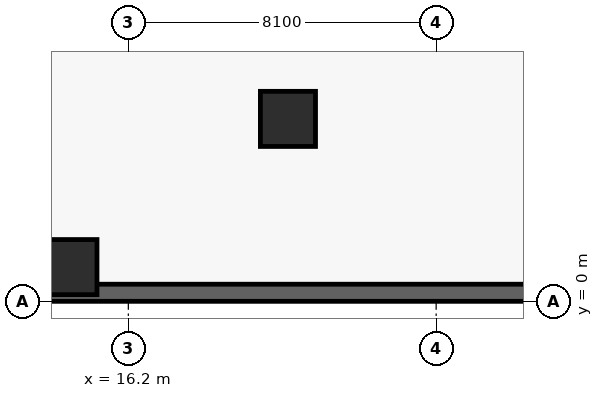
"""IFC4 building model, lengths in metres.
Left out: names, types, materials, properties, quantities, classifications, styles, units other than length and angle.
Written with IfcOpenShell. Run it as: python <this file> out.ifc"""

import sys

from ifc_helpers import new_model, si_unit, direction, frame, frame_2d, origin, origin_2d, place, context, subcontext, project, spatial, rectangle, extrude, source, transform, mapped, element, save


model = new_model("IFC4")
c1 = context("Model", 3, precision=1e-05, world=origin(), true_north=direction((0.0, 1.0)))
c2 = subcontext(c1, "Body", "Model", "MODEL_VIEW")
j1 = project(units=[si_unit("LENGTHUNIT", "METRE"), si_unit("PLANEANGLEUNIT", "RADIAN")], contexts=[c1])
p1 = place(None, origin())
s1 = spatial("IfcSite", under=j1, at=p1, CompositionType="ELEMENT")
p2 = place(p1, origin())
s2 = spatial("IfcBuilding", under=s1, at=p2, CompositionType="ELEMENT")
p3 = place(p2, frame((0.0, 0.0, -10.8)))
s3 = spatial("IfcBuildingStorey", under=s2, at=p3, CompositionType="ELEMENT", Elevation=-10.8)
p4 = place(p3, frame((0.225, 0.225, 0.0), z_axis=(0.0, 0.0, 1.0), x_axis=(1.0, 0.0, 0.0)))
e1 = element("IfcWall", 1, at=p4, inside=s3, PredefinedType="USERDEFINED", context=c2, shape_type="SweptSolid", body=[
    extrude(rectangle(XDim=64.35, YDim=0.45, at=frame_2d((32.175, 0.0))), origin(), (0.0, 0.0, 1.0), 3.238),
])
m1 = source(origin(), c2, "Body", "SweptSolid", [
    extrude(rectangle(XDim=1.45, YDim=1.45, at=origin_2d()), origin(), (0.0, 0.0, 1.0), 3.24),
])
for number, where, z_axis, x_axis in (
    (2, (20.4, 4.8, 0.0), (0.0, 0.0, 1.0), (1.0, 0.0, 0.0)),
    (3, (14.65, 0.9, 0.0), (0.0, 0.0, 1.0), (1.0, 0.0, 0.0)),
):
    element("IfcColumn", number, at=place(p3, frame(where, z_axis=z_axis, x_axis=x_axis)), inside=s3, PredefinedType="COLUMN", context=c2, shape_type="MappedRepresentation", body=[
        mapped(m1, transform((0.0, 0.0, 0.0), scale=1.0)),
    ])
save(model, sys.argv[1])
